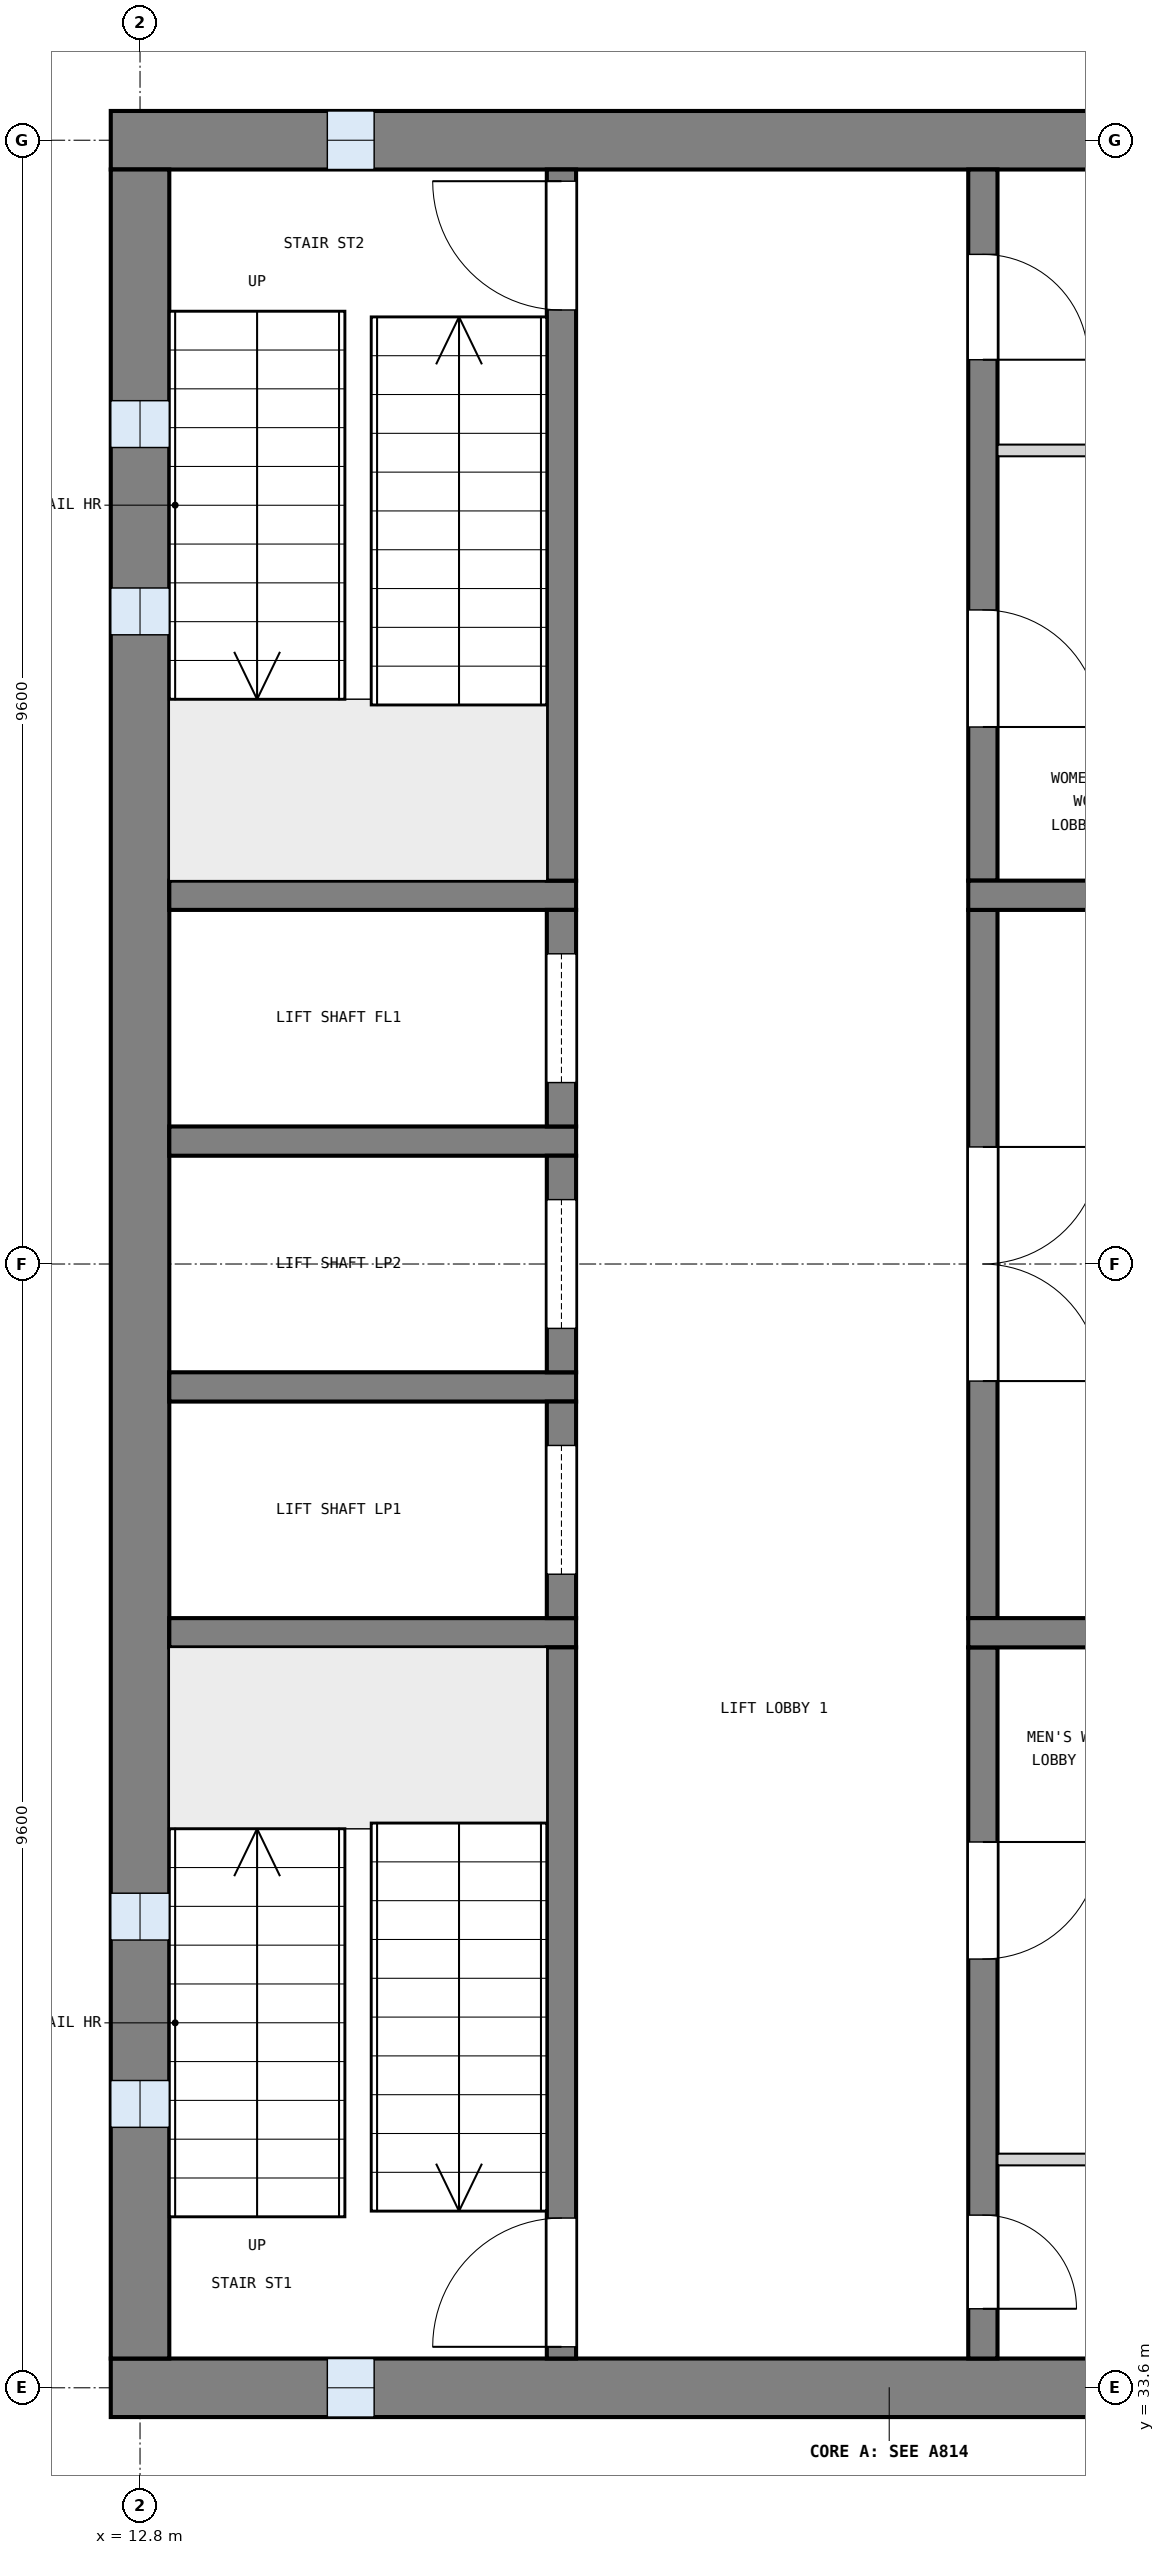
"""IFC4 building model, lengths in metres.
Left out: names, types, materials, properties, quantities, classifications, styles, units other than length and angle.
Written with IfcOpenShell. Run it as: python <this file> out.ifc"""

import sys

from ifc_helpers import new_model, si_unit, direction, frame, frame_2d, origin, place, context, subcontext, project, spatial, rectangle, extrude, element, fill, save


model = new_model("IFC4")
c1 = context("Model", 3, precision=1e-05, world=origin(), true_north=direction((0.0, 1.0)))
c2 = subcontext(c1, "Body", "Model", "MODEL_VIEW")
j1 = project(units=[si_unit("LENGTHUNIT", "METRE"), si_unit("PLANEANGLEUNIT", "RADIAN")], contexts=[c1])
p1 = place(None, origin())
s1 = spatial("IfcSite", under=j1, at=p1, CompositionType="ELEMENT")
p2 = place(p1, origin())
s2 = spatial("IfcBuilding", under=s1, at=p2, CompositionType="ELEMENT")
p3 = place(p2, frame((0.0, 0.0, 48.3)))
s3 = spatial("IfcBuildingStorey", under=s2, at=p3, CompositionType="ELEMENT", Elevation=48.3)
p4 = place(p3, frame((12.55, 52.8, 0.0), z_axis=(0.0, 0.0, 1.0), x_axis=(1.0, 0.0, 0.0)))
e1 = element("IfcWall", 1, at=p4, inside=s3, PredefinedType="SHEAR", context=c2, shape_type="SweptSolid", body=[
    extrude(rectangle(XDim=13.3, YDim=0.5, at=frame_2d((6.65, 0.0))), origin(), (0.0, 0.0, 1.0), 3.9),
])
p5 = place(p4, frame((1.85, 0.0, 1.0)))
e2 = element("IfcOpeningElement", 2, at=p5, cuts=e1, PredefinedType="OPENING", context=c2, shape_type="SweptSolid", body=[
    extrude(rectangle(XDim=0.4, YDim=2.0, at=frame_2d((0.2, 1.0))), frame((0.0, 0.26, 0.0), z_axis=(0.0, -1.0, 0.0), x_axis=(1.0, 0.0, 0.0)), (0.0, 0.0, 1.0), 0.52),
])
p6 = place(p3, frame((12.55, 33.6, 0.0), z_axis=(0.0, 0.0, 1.0), x_axis=(1.0, 0.0, 0.0)))
e3 = element("IfcWall", 3, at=p6, inside=s3, PredefinedType="SHEAR", context=c2, shape_type="SweptSolid", body=[
    extrude(rectangle(XDim=13.3, YDim=0.5, at=frame_2d((6.65, 0.0))), origin(), (0.0, 0.0, 1.0), 3.9),
])
p7 = place(p6, frame((1.85, 0.0, 1.0)))
e4 = element("IfcOpeningElement", 4, at=p7, cuts=e3, PredefinedType="OPENING", context=c2, shape_type="SweptSolid", body=[
    extrude(rectangle(XDim=0.4, YDim=2.0, at=frame_2d((0.2, 1.0))), frame((0.0, 0.26, 0.0), z_axis=(0.0, -1.0, 0.0), x_axis=(1.0, 0.0, 0.0)), (0.0, 0.0, 1.0), 0.52),
])
p8 = place(p3, frame((12.8, 33.85, 0.0), z_axis=(0.0, 0.0, 1.0), x_axis=(0.0, 1.0, 0.0)))
e5 = element("IfcWall", 5, at=p8, inside=s3, PredefinedType="SHEAR", context=c2, shape_type="SweptSolid", body=[
    extrude(rectangle(XDim=18.7, YDim=0.5, at=frame_2d((9.35, 0.0))), origin(), (0.0, 0.0, 1.0), 3.9),
])
p9 = place(p8, frame((1.975, 0.0, 1.0)))
e6 = element("IfcOpeningElement", 6, at=p9, cuts=e5, PredefinedType="OPENING", context=c2, shape_type="SweptSolid", body=[
    extrude(rectangle(XDim=0.4, YDim=2.0, at=frame_2d((0.2, 1.0))), frame((0.0, 0.26, 0.0), z_axis=(0.0, -1.0, 0.0), x_axis=(1.0, 0.0, 0.0)), (0.0, 0.0, 1.0), 0.52),
])
p10 = place(p8, frame((3.575, 0.0, 1.0)))
e7 = element("IfcOpeningElement", 7, at=p10, cuts=e5, PredefinedType="OPENING", context=c2, shape_type="SweptSolid", body=[
    extrude(rectangle(XDim=0.4, YDim=2.0, at=frame_2d((0.2, 1.0))), frame((0.0, 0.26, 0.0), z_axis=(0.0, -1.0, 0.0), x_axis=(1.0, 0.0, 0.0)), (0.0, 0.0, 1.0), 0.52),
])
p11 = place(p8, frame((14.725, 0.0, 1.0)))
e8 = element("IfcOpeningElement", 8, at=p11, cuts=e5, PredefinedType="OPENING", context=c2, shape_type="SweptSolid", body=[
    extrude(rectangle(XDim=0.4, YDim=2.0, at=frame_2d((0.2, 1.0))), frame((0.0, 0.26, 0.0), z_axis=(0.0, -1.0, 0.0), x_axis=(1.0, 0.0, 0.0)), (0.0, 0.0, 1.0), 0.52),
])
p12 = place(p8, frame((16.325, 0.0, 1.0)))
e9 = element("IfcOpeningElement", 9, at=p12, cuts=e5, PredefinedType="OPENING", context=c2, shape_type="SweptSolid", body=[
    extrude(rectangle(XDim=0.4, YDim=2.0, at=frame_2d((0.2, 1.0))), frame((0.0, 0.26, 0.0), z_axis=(0.0, -1.0, 0.0), x_axis=(1.0, 0.0, 0.0)), (0.0, 0.0, 1.0), 0.52),
])
for number, where, z_axis, x_axis in (
    (10, (13.05, 40.05, 0.0), (0.0, 0.0, 1.0), (1.0, 0.0, 0.0)),
    (11, (13.05, 42.15, 0.0), (0.0, 0.0, 1.0), (1.0, 0.0, 0.0)),
    (12, (13.05, 44.25, 0.0), (0.0, 0.0, 1.0), (1.0, 0.0, 0.0)),
    (13, (13.05, 46.35, 0.0), (0.0, 0.0, 1.0), (1.0, 0.0, 0.0)),
):
    element("IfcWall", number, at=place(p3, frame(where, z_axis=z_axis, x_axis=x_axis)), inside=s3, PredefinedType="SOLIDWALL", context=c2, shape_type="SweptSolid", body=[
        extrude(rectangle(XDim=3.475, YDim=0.25, at=frame_2d((1.737, 0.0))), origin(), (0.0, 0.0, 1.0), 3.6),
    ])
p13 = place(p3, frame((16.4, 33.85, 0.0), z_axis=(0.0, 0.0, 1.0), x_axis=(0.0, 1.0, 0.0)))
e14 = element("IfcWall", 14, at=p13, inside=s3, PredefinedType="SOLIDWALL", context=c2, shape_type="SweptSolid", body=[
    extrude(rectangle(XDim=6.075, YDim=0.25, at=frame_2d((3.038, 0.0))), origin(), (0.0, 0.0, 1.0), 3.6),
])
p14 = place(p13, frame((0.1, 0.0, 0.0)))
e15 = element("IfcOpeningElement", 15, at=p14, cuts=e14, PredefinedType="OPENING", context=c2, shape_type="SweptSolid", body=[
    extrude(rectangle(XDim=1.1, YDim=2.1, at=frame_2d((0.55, 1.05))), frame((0.0, 0.135, 0.0), z_axis=(0.0, -1.0, 0.0), x_axis=(1.0, 0.0, 0.0)), (0.0, 0.0, 1.0), 0.27),
])
p15 = place(p3, frame((16.4, 40.175, 0.0), z_axis=(0.0, 0.0, 1.0), x_axis=(0.0, 1.0, 0.0)))
e16 = element("IfcWall", 16, at=p15, inside=s3, PredefinedType="SOLIDWALL", context=c2, shape_type="SweptSolid", body=[
    extrude(rectangle(XDim=1.85, YDim=0.25, at=frame_2d((0.925, 0.0))), origin(), (0.0, 0.0, 1.0), 3.6),
])
p16 = place(p15, frame((0.375, 0.0, 0.0)))
e17 = element("IfcOpeningElement", 17, at=p16, cuts=e16, PredefinedType="OPENING", context=c2, shape_type="SweptSolid", body=[
    extrude(rectangle(XDim=1.1, YDim=2.1, at=frame_2d((0.55, 1.05))), frame((0.0, 0.135, 0.0), z_axis=(0.0, -1.0, 0.0), x_axis=(1.0, 0.0, 0.0)), (0.0, 0.0, 1.0), 0.27),
])
p17 = place(p3, frame((16.4, 42.275, 0.0), z_axis=(0.0, 0.0, 1.0), x_axis=(0.0, 1.0, 0.0)))
e18 = element("IfcWall", 18, at=p17, inside=s3, PredefinedType="SOLIDWALL", context=c2, shape_type="SweptSolid", body=[
    extrude(rectangle(XDim=1.85, YDim=0.25, at=frame_2d((0.925, 0.0))), origin(), (0.0, 0.0, 1.0), 3.6),
])
p18 = place(p17, frame((0.375, 0.0, 0.0)))
e19 = element("IfcOpeningElement", 19, at=p18, cuts=e18, PredefinedType="OPENING", context=c2, shape_type="SweptSolid", body=[
    extrude(rectangle(XDim=1.1, YDim=2.1, at=frame_2d((0.55, 1.05))), frame((0.0, 0.135, 0.0), z_axis=(0.0, -1.0, 0.0), x_axis=(1.0, 0.0, 0.0)), (0.0, 0.0, 1.0), 0.27),
])
p19 = place(p3, frame((16.4, 44.375, 0.0), z_axis=(0.0, 0.0, 1.0), x_axis=(0.0, 1.0, 0.0)))
e20 = element("IfcWall", 20, at=p19, inside=s3, PredefinedType="SOLIDWALL", context=c2, shape_type="SweptSolid", body=[
    extrude(rectangle(XDim=1.85, YDim=0.25, at=frame_2d((0.925, 0.0))), origin(), (0.0, 0.0, 1.0), 3.6),
])
p20 = place(p19, frame((0.375, 0.0, 0.0)))
e21 = element("IfcOpeningElement", 21, at=p20, cuts=e20, PredefinedType="OPENING", context=c2, shape_type="SweptSolid", body=[
    extrude(rectangle(XDim=1.1, YDim=2.1, at=frame_2d((0.55, 1.05))), frame((0.0, 0.135, 0.0), z_axis=(0.0, -1.0, 0.0), x_axis=(1.0, 0.0, 0.0)), (0.0, 0.0, 1.0), 0.27),
])
p21 = place(p3, frame((16.4, 46.475, 0.0), z_axis=(0.0, 0.0, 1.0), x_axis=(0.0, 1.0, 0.0)))
e22 = element("IfcWall", 22, at=p21, inside=s3, PredefinedType="SOLIDWALL", context=c2, shape_type="SweptSolid", body=[
    extrude(rectangle(XDim=6.075, YDim=0.25, at=frame_2d((3.038, 0.0))), origin(), (0.0, 0.0, 1.0), 3.6),
])
p22 = place(p21, frame((4.875, 0.0, 0.0)))
e23 = element("IfcOpeningElement", 23, at=p22, cuts=e22, PredefinedType="OPENING", context=c2, shape_type="SweptSolid", body=[
    extrude(rectangle(XDim=1.1, YDim=2.1, at=frame_2d((0.55, 1.05))), frame((0.0, 0.135, 0.0), z_axis=(0.0, -1.0, 0.0), x_axis=(1.0, 0.0, 0.0)), (0.0, 0.0, 1.0), 0.27),
])
p23 = place(p3, frame((20.0, 33.85, 0.0), z_axis=(0.0, 0.0, 1.0), x_axis=(0.0, 1.0, 0.0)))
e24 = element("IfcWall", 24, at=p23, inside=s3, PredefinedType="SOLIDWALL", context=c2, shape_type="SweptSolid", body=[
    extrude(rectangle(XDim=6.075, YDim=0.25, at=frame_2d((3.038, 0.0))), origin(), (0.0, 0.0, 1.0), 3.6),
])
p24 = place(p23, frame((0.425, 0.0, 0.0)))
e25 = element("IfcOpeningElement", 25, at=p24, cuts=e24, PredefinedType="OPENING", context=c2, shape_type="SweptSolid", body=[
    extrude(rectangle(XDim=0.8, YDim=2.1, at=frame_2d((0.4, 1.05))), frame((0.0, 0.135, 0.0), z_axis=(0.0, -1.0, 0.0), x_axis=(1.0, 0.0, 0.0)), (0.0, 0.0, 1.0), 0.27),
])
p25 = place(p23, frame((3.413, 0.0, 0.0)))
e26 = element("IfcOpeningElement", 26, at=p25, cuts=e24, PredefinedType="OPENING", context=c2, shape_type="SweptSolid", body=[
    extrude(rectangle(XDim=1.0, YDim=2.1, at=frame_2d((0.5, 1.05))), frame((0.0, 0.135, 0.0), z_axis=(0.0, -1.0, 0.0), x_axis=(1.0, 0.0, 0.0)), (0.0, 0.0, 1.0), 0.27),
])
p26 = place(p3, frame((20.0, 40.175, 0.0), z_axis=(0.0, 0.0, 1.0), x_axis=(0.0, 1.0, 0.0)))
e27 = element("IfcWall", 27, at=p26, inside=s3, PredefinedType="SOLIDWALL", context=c2, shape_type="SweptSolid", body=[
    extrude(rectangle(XDim=6.05, YDim=0.25, at=frame_2d((3.025, 0.0))), origin(), (0.0, 0.0, 1.0), 3.6),
])
p27 = place(p26, frame((2.025, 0.0, 0.0)))
e28 = element("IfcOpeningElement", 28, at=p27, cuts=e27, PredefinedType="OPENING", context=c2, shape_type="SweptSolid", body=[
    extrude(rectangle(XDim=2.0, YDim=2.1, at=frame_2d((1.0, 1.05))), frame((0.0, 0.135, 0.0), z_axis=(0.0, -1.0, 0.0), x_axis=(1.0, 0.0, 0.0)), (0.0, 0.0, 1.0), 0.27),
])
p28 = place(p3, frame((20.0, 46.475, 0.0), z_axis=(0.0, 0.0, 1.0), x_axis=(0.0, 1.0, 0.0)))
e29 = element("IfcWall", 29, at=p28, inside=s3, PredefinedType="SOLIDWALL", context=c2, shape_type="SweptSolid", body=[
    extrude(rectangle(XDim=6.075, YDim=0.25, at=frame_2d((3.038, 0.0))), origin(), (0.0, 0.0, 1.0), 3.6),
])
p29 = place(p28, frame((1.312, 0.0, 0.0)))
e30 = element("IfcOpeningElement", 30, at=p29, cuts=e29, PredefinedType="OPENING", context=c2, shape_type="SweptSolid", body=[
    extrude(rectangle(XDim=1.0, YDim=2.1, at=frame_2d((0.5, 1.05))), frame((0.0, 0.135, 0.0), z_axis=(0.0, -1.0, 0.0), x_axis=(1.0, 0.0, 0.0)), (0.0, 0.0, 1.0), 0.27),
])
p30 = place(p28, frame((4.45, 0.0, 0.0)))
e31 = element("IfcOpeningElement", 31, at=p30, cuts=e29, PredefinedType="OPENING", context=c2, shape_type="SweptSolid", body=[
    extrude(rectangle(XDim=0.9, YDim=2.1, at=frame_2d((0.45, 1.05))), frame((0.0, 0.135, 0.0), z_axis=(0.0, -1.0, 0.0), x_axis=(1.0, 0.0, 0.0)), (0.0, 0.0, 1.0), 0.27),
])
for number, where, z_axis, x_axis in (
    (32, (19.875, 40.05, 0.0), (0.0, 0.0, 1.0), (1.0, 0.0, 0.0)),
    (33, (19.875, 46.35, 0.0), (0.0, 0.0, 1.0), (1.0, 0.0, 0.0)),
):
    element("IfcWall", number, at=place(p3, frame(where, z_axis=z_axis, x_axis=x_axis)), inside=s3, PredefinedType="SOLIDWALL", context=c2, shape_type="SweptSolid", body=[
        extrude(rectangle(XDim=5.475, YDim=0.25, at=frame_2d((2.738, 0.0))), origin(), (0.0, 0.0, 1.0), 3.6),
    ])
for number, where, z_axis, x_axis in (
    (34, (20.125, 35.55, 0.0), (0.0, 0.0, 1.0), (1.0, 0.0, 0.0)),
    (35, (20.125, 50.15, 0.0), (0.0, 0.0, 1.0), (1.0, 0.0, 0.0)),
):
    element("IfcWall", number, at=place(p3, frame(where, z_axis=z_axis, x_axis=x_axis)), inside=s3, PredefinedType="PARTITIONING", context=c2, shape_type="SweptSolid", body=[
        extrude(rectangle(XDim=5.225, YDim=0.1, at=frame_2d((2.613, 0.0))), origin(), (0.0, 0.0, 1.0), 3.6),
    ])
p31 = place(p9, origin())
e36 = element("IfcWindow", 36, at=p31, inside=s3, PartitioningType="SINGLE_PANEL", PredefinedType="WINDOW", context=c2, shape_type="SweptSolid", body=[
    extrude(rectangle(XDim=0.4, YDim=2.0, at=frame_2d((0.2, 1.0))), frame((0.0, 0.03, 0.0), z_axis=(0.0, -1.0, 0.0), x_axis=(1.0, 0.0, 0.0)), (0.0, 0.0, 1.0), 0.06),
])
fill(e6, e36)
p32 = place(p10, origin())
e37 = element("IfcWindow", 37, at=p32, inside=s3, PartitioningType="SINGLE_PANEL", PredefinedType="WINDOW", context=c2, shape_type="SweptSolid", body=[
    extrude(rectangle(XDim=0.4, YDim=2.0, at=frame_2d((0.2, 1.0))), frame((0.0, 0.03, 0.0), z_axis=(0.0, -1.0, 0.0), x_axis=(1.0, 0.0, 0.0)), (0.0, 0.0, 1.0), 0.06),
])
fill(e7, e37)
p33 = place(p11, origin())
e38 = element("IfcWindow", 38, at=p33, inside=s3, PartitioningType="SINGLE_PANEL", PredefinedType="WINDOW", context=c2, shape_type="SweptSolid", body=[
    extrude(rectangle(XDim=0.4, YDim=2.0, at=frame_2d((0.2, 1.0))), frame((0.0, 0.03, 0.0), z_axis=(0.0, -1.0, 0.0), x_axis=(1.0, 0.0, 0.0)), (0.0, 0.0, 1.0), 0.06),
])
fill(e8, e38)
p34 = place(p12, origin())
e39 = element("IfcWindow", 39, at=p34, inside=s3, PartitioningType="SINGLE_PANEL", PredefinedType="WINDOW", context=c2, shape_type="SweptSolid", body=[
    extrude(rectangle(XDim=0.4, YDim=2.0, at=frame_2d((0.2, 1.0))), frame((0.0, 0.03, 0.0), z_axis=(0.0, -1.0, 0.0), x_axis=(1.0, 0.0, 0.0)), (0.0, 0.0, 1.0), 0.06),
])
fill(e9, e39)
p35 = place(p7, origin())
e40 = element("IfcWindow", 40, at=p35, inside=s3, PartitioningType="SINGLE_PANEL", PredefinedType="WINDOW", context=c2, shape_type="SweptSolid", body=[
    extrude(rectangle(XDim=0.4, YDim=2.0, at=frame_2d((0.2, 1.0))), frame((0.0, 0.03, 0.0), z_axis=(0.0, -1.0, 0.0), x_axis=(1.0, 0.0, 0.0)), (0.0, 0.0, 1.0), 0.06),
])
fill(e4, e40)
p36 = place(p5, origin())
e41 = element("IfcWindow", 41, at=p36, inside=s3, PartitioningType="SINGLE_PANEL", PredefinedType="WINDOW", context=c2, shape_type="SweptSolid", body=[
    extrude(rectangle(XDim=0.4, YDim=2.0, at=frame_2d((0.2, 1.0))), frame((0.0, 0.03, 0.0), z_axis=(0.0, -1.0, 0.0), x_axis=(1.0, 0.0, 0.0)), (0.0, 0.0, 1.0), 0.06),
])
fill(e2, e41)
p37 = place(p14, origin())
e42 = element("IfcDoor", 42, at=p37, inside=s3, OperationType="SINGLE_SWING_LEFT", PredefinedType="DOOR", context=c2, shape_type="SweptSolid", body=[
    extrude(rectangle(XDim=1.1, YDim=2.1, at=frame_2d((0.55, 1.05))), frame((0.0, 0.025, 0.0), z_axis=(0.0, -1.0, 0.0), x_axis=(1.0, 0.0, 0.0)), (0.0, 0.0, 1.0), 0.05),
])
fill(e15, e42)
p38 = place(p22, origin())
e43 = element("IfcDoor", 43, at=p38, inside=s3, OperationType="SINGLE_SWING_RIGHT", PredefinedType="DOOR", context=c2, shape_type="SweptSolid", body=[
    extrude(rectangle(XDim=1.1, YDim=2.1, at=frame_2d((0.55, 1.05))), frame((0.0, 0.025, 0.0), z_axis=(0.0, -1.0, 0.0), x_axis=(1.0, 0.0, 0.0)), (0.0, 0.0, 1.0), 0.05),
])
fill(e23, e43)
p39 = place(p16, origin())
e44 = element("IfcDoor", 44, at=p39, inside=s3, OperationType="SLIDING_TO_LEFT", PredefinedType="DOOR", context=c2, shape_type="SweptSolid", body=[
    extrude(rectangle(XDim=1.1, YDim=2.1, at=frame_2d((0.55, 1.05))), frame((0.0, 0.025, 0.0), z_axis=(0.0, -1.0, 0.0), x_axis=(1.0, 0.0, 0.0)), (0.0, 0.0, 1.0), 0.05),
])
fill(e17, e44)
p40 = place(p18, origin())
e45 = element("IfcDoor", 45, at=p40, inside=s3, OperationType="SLIDING_TO_LEFT", PredefinedType="DOOR", context=c2, shape_type="SweptSolid", body=[
    extrude(rectangle(XDim=1.1, YDim=2.1, at=frame_2d((0.55, 1.05))), frame((0.0, 0.025, 0.0), z_axis=(0.0, -1.0, 0.0), x_axis=(1.0, 0.0, 0.0)), (0.0, 0.0, 1.0), 0.05),
])
fill(e19, e45)
p41 = place(p20, origin())
e46 = element("IfcDoor", 46, at=p41, inside=s3, OperationType="SLIDING_TO_LEFT", PredefinedType="DOOR", context=c2, shape_type="SweptSolid", body=[
    extrude(rectangle(XDim=1.1, YDim=2.1, at=frame_2d((0.55, 1.05))), frame((0.0, 0.025, 0.0), z_axis=(0.0, -1.0, 0.0), x_axis=(1.0, 0.0, 0.0)), (0.0, 0.0, 1.0), 0.05),
])
fill(e21, e46)
p42 = place(p27, frame((2.0, 0.0, 0.0), z_axis=(0.0, 0.0, 1.0), x_axis=(-1.0, 0.0, 0.0)))
e47 = element("IfcDoor", 47, at=p42, inside=s3, OperationType="DOUBLE_DOOR_SINGLE_SWING", PredefinedType="DOOR", context=c2, shape_type="SweptSolid", body=[
    extrude(rectangle(XDim=2.0, YDim=2.1, at=frame_2d((1.0, 1.05))), frame((0.0, 0.025, 0.0), z_axis=(0.0, -1.0, 0.0), x_axis=(1.0, 0.0, 0.0)), (0.0, 0.0, 1.0), 0.05),
])
fill(e28, e47)
p43 = place(p24, frame((0.8, 0.0, 0.0), z_axis=(0.0, 0.0, 1.0), x_axis=(-1.0, 0.0, 0.0)))
e48 = element("IfcDoor", 48, at=p43, inside=s3, OperationType="SINGLE_SWING_RIGHT", PredefinedType="DOOR", context=c2, shape_type="SweptSolid", body=[
    extrude(rectangle(XDim=0.8, YDim=2.1, at=frame_2d((0.4, 1.05))), frame((0.0, 0.025, 0.0), z_axis=(0.0, -1.0, 0.0), x_axis=(1.0, 0.0, 0.0)), (0.0, 0.0, 1.0), 0.05),
])
fill(e25, e48)
p44 = place(p25, frame((1.0, 0.0, 0.0), z_axis=(0.0, 0.0, 1.0), x_axis=(-1.0, 0.0, 0.0)))
e49 = element("IfcDoor", 49, at=p44, inside=s3, OperationType="SINGLE_SWING_LEFT", PredefinedType="DOOR", context=c2, shape_type="SweptSolid", body=[
    extrude(rectangle(XDim=1.0, YDim=2.1, at=frame_2d((0.5, 1.05))), frame((0.0, 0.025, 0.0), z_axis=(0.0, -1.0, 0.0), x_axis=(1.0, 0.0, 0.0)), (0.0, 0.0, 1.0), 0.05),
])
fill(e26, e49)
p45 = place(p29, frame((1.0, 0.0, 0.0), z_axis=(0.0, 0.0, 1.0), x_axis=(-1.0, 0.0, 0.0)))
e50 = element("IfcDoor", 50, at=p45, inside=s3, OperationType="SINGLE_SWING_RIGHT", PredefinedType="DOOR", context=c2, shape_type="SweptSolid", body=[
    extrude(rectangle(XDim=1.0, YDim=2.1, at=frame_2d((0.5, 1.05))), frame((0.0, 0.025, 0.0), z_axis=(0.0, -1.0, 0.0), x_axis=(1.0, 0.0, 0.0)), (0.0, 0.0, 1.0), 0.05),
])
fill(e30, e50)
p46 = place(p30, frame((0.9, 0.0, 0.0), z_axis=(0.0, 0.0, 1.0), x_axis=(-1.0, 0.0, 0.0)))
e51 = element("IfcDoor", 51, at=p46, inside=s3, OperationType="SINGLE_SWING_RIGHT", PredefinedType="DOOR", context=c2, shape_type="SweptSolid", body=[
    extrude(rectangle(XDim=0.9, YDim=2.1, at=frame_2d((0.45, 1.05))), frame((0.0, 0.025, 0.0), z_axis=(0.0, -1.0, 0.0), x_axis=(1.0, 0.0, 0.0)), (0.0, 0.0, 1.0), 0.05),
])
fill(e31, e51)
save(model, sys.argv[1])
